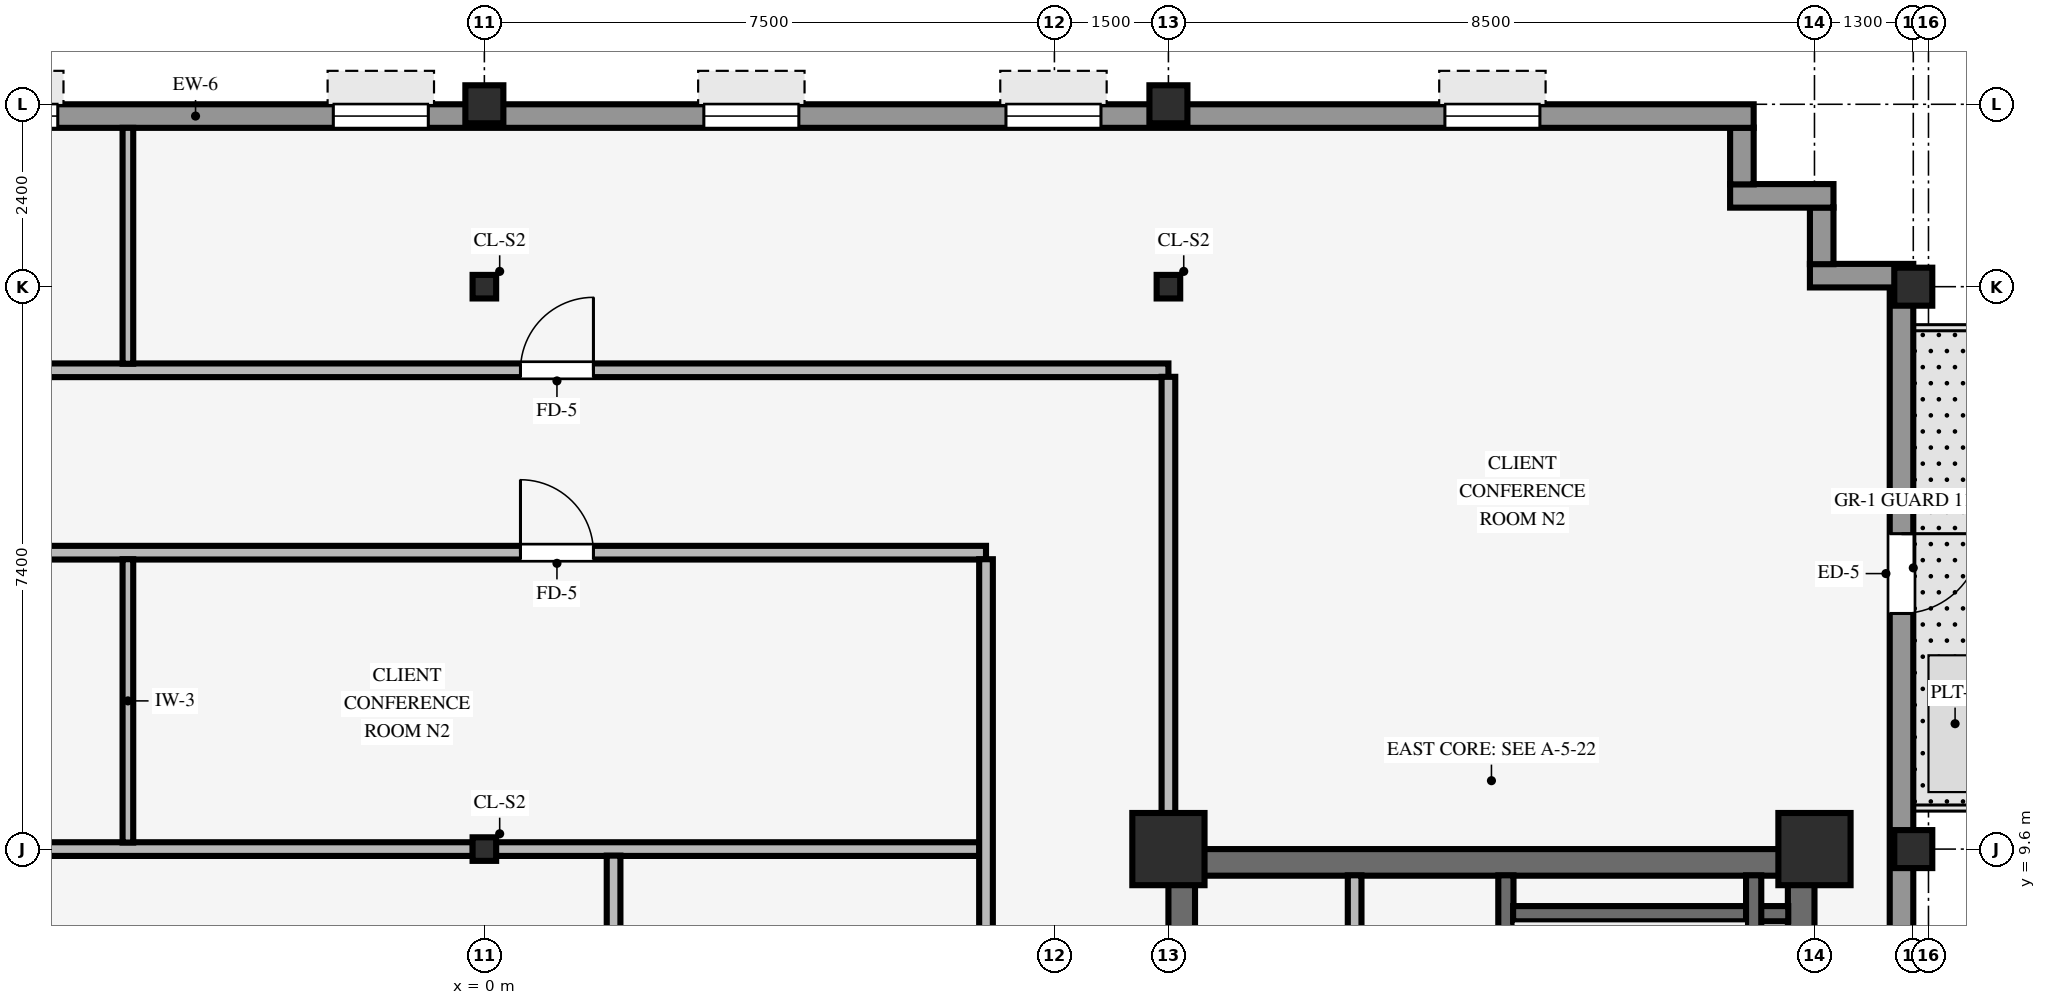
"""IFC4 building model, lengths in metres.
Left out: names, types, materials, properties, quantities, classifications, styles, units other than length and angle.
Written with IfcOpenShell. Run it as: python <this file> out.ifc"""

import sys

from ifc_helpers import new_model, si_unit, direction, frame, frame_2d, origin, origin_2d, place, context, subcontext, project, spatial, rectangle, hollow_rectangle, i_section, extrude, source, transform, mapped, element, fill, save


model = new_model("IFC4")
c1 = context("Model", 3, precision=1e-05, world=origin(), true_north=direction((0.0, 1.0)))
c2 = subcontext(c1, "Body", "Model", "MODEL_VIEW")
j1 = project(units=[si_unit("LENGTHUNIT", "METRE"), si_unit("PLANEANGLEUNIT", "RADIAN")], contexts=[c1])
p1 = place(None, origin())
s1 = spatial("IfcSite", under=j1, at=p1, CompositionType="ELEMENT")
p2 = place(p1, origin())
s2 = spatial("IfcBuilding", under=s1, at=p2, CompositionType="ELEMENT")
p3 = place(p2, frame((0.0, 0.0, 212.8)))
s3 = spatial("IfcBuildingStorey", under=s2, at=p3, CompositionType="ELEMENT", Elevation=212.8)
p4 = place(p3, frame((9.0, 9.425, 0.0), z_axis=(0.0, 0.0, 1.0), x_axis=(1.0, 0.0, 0.0)))
e1 = element("IfcWall", 1, at=p4, inside=s3, PredefinedType="SHEAR", context=c2, shape_type="SweptSolid", body=[
    extrude(rectangle(XDim=8.5, YDim=0.35, at=frame_2d((4.25, 0.0))), origin(), (0.0, 0.0, 1.0), 3.37),
])
p5 = place(p3, frame((9.175, -9.255, 0.0), z_axis=(0.0, 0.0, 1.0), x_axis=(0.0, 1.0, 0.0)))
e2 = element("IfcWall", 2, at=p5, inside=s3, PredefinedType="SHEAR", context=c2, shape_type="SweptSolid", body=[
    extrude(rectangle(XDim=18.51, YDim=0.35, at=frame_2d((9.255, 0.0))), origin(), (0.0, 0.0, 1.0), 3.37),
])
p6 = place(p5, frame((8.655, 0.0, 0.0)))
e3 = element("IfcOpeningElement", 3, at=p6, cuts=e2, PredefinedType="OPENING", context=c2, shape_type="SweptSolid", body=[
    extrude(rectangle(XDim=1.2, YDim=2.15, at=frame_2d((0.6, 1.075))), frame((0.0, 0.185, 0.0), z_axis=(0.0, -1.0, 0.0), x_axis=(1.0, 0.0, 0.0)), (0.0, 0.0, 1.0), 0.37),
])
p7 = place(p3, frame((17.325, -9.255, 0.0), z_axis=(0.0, 0.0, 1.0), x_axis=(0.0, 1.0, 0.0)))
e4 = element("IfcWall", 4, at=p7, inside=s3, PredefinedType="SHEAR", context=c2, shape_type="SweptSolid", body=[
    extrude(rectangle(XDim=18.51, YDim=0.35, at=frame_2d((9.255, 0.0))), origin(), (0.0, 0.0, 1.0), 3.37),
])
for number, where, z_axis, x_axis in (
    (5, (9.0, 9.6, 0.0), (0.0, 0.0, 1.0), (1.0, 0.0, 0.0)),
    (6, (17.5, 9.6, 0.0), (0.0, 0.0, 1.0), (1.0, 0.0, 0.0)),
):
    element("IfcColumn", number, at=place(p3, frame(where, z_axis=z_axis, x_axis=x_axis)), inside=s3, PredefinedType="COLUMN", context=c2, shape_type="SweptSolid", body=[
        extrude(rectangle(XDim=0.95, YDim=0.95, at=origin_2d()), origin(), (0.0, 0.0, 1.0), 3.37),
    ])
for number, where, z_axis, x_axis in (
    (7, (18.8, 9.6, 0.0), (0.0, 0.0, 1.0), (1.0, 0.0, 0.0)),
    (8, (18.8, 17.0, 0.0), (0.0, 0.0, 1.0), (1.0, 0.0, 0.0)),
    (9, (0.0, 19.4, 0.0), (0.0, 0.0, 1.0), (1.0, 0.0, 0.0)),
    (10, (9.0, 19.4, 0.0), (0.0, 0.0, 1.0), (1.0, 0.0, 0.0)),
):
    element("IfcColumn", number, at=place(p3, frame(where, z_axis=z_axis, x_axis=x_axis)), inside=s3, PredefinedType="COLUMN", context=c2, shape_type="SweptSolid", body=[
        extrude(hollow_rectangle(XDim=0.5, YDim=0.5, WallThickness=0.032, InnerFilletRadius=0.032, OuterFilletRadius=0.064, at=origin_2d()), origin(), (0.0, 0.0, 1.0), 3.37),
    ])
for number, where, z_axis, x_axis in (
    (11, (0.0, 9.6, 0.0), (0.0, 0.0, 1.0), (1.0, 0.0, 0.0)),
    (12, (0.0, 17.0, 0.0), (0.0, 0.0, 1.0), (1.0, 0.0, 0.0)),
    (13, (9.0, 17.0, 0.0), (0.0, 0.0, 1.0), (1.0, 0.0, 0.0)),
):
    element("IfcColumn", number, at=place(p3, frame(where, z_axis=z_axis, x_axis=x_axis)), inside=s3, PredefinedType="COLUMN", context=c2, shape_type="SweptSolid", body=[
        extrude(i_section(OverallWidth=0.31, OverallDepth=0.31, WebThickness=0.015, FlangeThickness=0.015, FilletRadius=0.015, at=origin_2d()), origin(), (0.0, 0.0, 1.0), 3.37),
    ])
p8 = place(p3, frame((18.645, -16.994, 0.0), z_axis=(0.0, 0.0, 1.0), x_axis=(0.0, 1.0, 0.0)))
e14 = element("IfcWall", 14, at=p8, inside=s3, PredefinedType="STANDARD", context=c2, shape_type="SweptSolid", body=[
    extrude(rectangle(XDim=33.988, YDim=0.31, at=frame_2d((16.994, 0.0))), origin(), (0.0, 0.0, 1.0), 2.705),
])
p9 = place(p8, frame((30.744, 0.0, 0.0), z_axis=(0.0, 0.0, 1.0), x_axis=(-1.0, 0.0, 0.0)))
e15 = element("IfcOpeningElement", 15, at=p9, cuts=e14, PredefinedType="OPENING", context=c2, shape_type="SweptSolid", body=[
    extrude(rectangle(XDim=1.05, YDim=2.1, at=frame_2d((0.525, 1.05))), frame((0.0, 0.165, 0.0), z_axis=(0.0, -1.0, 0.0), x_axis=(1.0, 0.0, 0.0)), (0.0, 0.0, 1.0), 0.33),
])
p10 = place(p8, frame((2.26, 0.0, 0.8)))
e16 = element("IfcOpeningElement", 16, at=p10, cuts=e14, PredefinedType="OPENING", context=c2, shape_type="SweptSolid", body=[
    extrude(rectangle(XDim=2.05, YDim=1.52, at=frame_2d((1.025, 0.76))), frame((0.0, 0.165, 0.0), z_axis=(0.0, -1.0, 0.0), x_axis=(1.0, 0.0, 0.0)), (0.0, 0.0, 1.0), 0.33),
])
p11 = place(p3, frame((17.44, 17.145, 0.0), z_axis=(0.0, 0.0, 1.0), x_axis=(1.0, 0.0, 0.0)))
e17 = element("IfcWall", 17, at=p11, inside=s3, PredefinedType="STANDARD", context=c2, shape_type="SweptSolid", body=[
    extrude(rectangle(XDim=1.36, YDim=0.31, at=frame_2d((0.68, 0.0))), origin(), (0.0, 0.0, 1.0), 2.816),
])
p12 = place(p3, frame((17.595, 17.296, 0.0), z_axis=(0.0, 0.0, 1.0), x_axis=(0.0, 1.0, 0.0)))
e18 = element("IfcWall", 18, at=p12, inside=s3, PredefinedType="STANDARD", context=c2, shape_type="SweptSolid", body=[
    extrude(rectangle(XDim=0.748, YDim=0.31, at=frame_2d((0.374, 0.0))), origin(), (0.0, 0.0, 1.0), 2.816),
])
p13 = place(p3, frame((16.39, 18.195, 0.0), z_axis=(0.0, 0.0, 1.0), x_axis=(1.0, 0.0, 0.0)))
e19 = element("IfcWall", 19, at=p13, inside=s3, PredefinedType="STANDARD", context=c2, shape_type="SweptSolid", body=[
    extrude(rectangle(XDim=1.36, YDim=0.31, at=frame_2d((0.68, 0.0))), origin(), (0.0, 0.0, 1.0), 2.816),
])
p14 = place(p3, frame((16.545, 18.346, 0.0), z_axis=(0.0, 0.0, 1.0), x_axis=(0.0, 1.0, 0.0)))
e20 = element("IfcWall", 20, at=p14, inside=s3, PredefinedType="STANDARD", context=c2, shape_type="SweptSolid", body=[
    extrude(rectangle(XDim=0.748, YDim=0.31, at=frame_2d((0.374, 0.0))), origin(), (0.0, 0.0, 1.0), 2.816),
])
p15 = place(p3, frame((-24.3, 19.245, 0.0), z_axis=(0.0, 0.0, 1.0), x_axis=(1.0, 0.0, 0.0)))
e21 = element("IfcWall", 21, at=p15, inside=s3, PredefinedType="STANDARD", context=c2, shape_type="SweptSolid", body=[
    extrude(rectangle(XDim=41.0, YDim=0.31, at=frame_2d((20.5, 0.0))), origin(), (0.0, 0.0, 1.0), 2.705),
])
p16 = place(p15, frame((2.812, 0.0, 0.8)))
e22 = element("IfcOpeningElement", 22, at=p16, cuts=e21, PredefinedType="OPENING", context=c2, shape_type="SweptSolid", body=[
    extrude(rectangle(XDim=1.25, YDim=1.52, at=frame_2d((0.625, 0.76))), frame((0.0, 0.165, 0.0), z_axis=(0.0, -1.0, 0.0), x_axis=(1.0, 0.0, 0.0)), (0.0, 0.0, 1.0), 0.33),
])
p17 = place(p15, frame((7.688, 0.0, 0.8)))
e23 = element("IfcOpeningElement", 23, at=p17, cuts=e21, PredefinedType="OPENING", context=c2, shape_type="SweptSolid", body=[
    extrude(rectangle(XDim=1.25, YDim=1.52, at=frame_2d((0.625, 0.76))), frame((0.0, 0.165, 0.0), z_axis=(0.0, -1.0, 0.0), x_axis=(1.0, 0.0, 0.0)), (0.0, 0.0, 1.0), 0.33),
])
p18 = place(p15, frame((12.562, 0.0, 0.8)))
e24 = element("IfcOpeningElement", 24, at=p18, cuts=e21, PredefinedType="OPENING", context=c2, shape_type="SweptSolid", body=[
    extrude(rectangle(XDim=1.25, YDim=1.52, at=frame_2d((0.625, 0.76))), frame((0.0, 0.165, 0.0), z_axis=(0.0, -1.0, 0.0), x_axis=(1.0, 0.0, 0.0)), (0.0, 0.0, 1.0), 0.33),
])
p19 = place(p15, frame((17.438, 0.0, 0.8)))
e25 = element("IfcOpeningElement", 25, at=p19, cuts=e21, PredefinedType="OPENING", context=c2, shape_type="SweptSolid", body=[
    extrude(rectangle(XDim=1.25, YDim=1.52, at=frame_2d((0.625, 0.76))), frame((0.0, 0.165, 0.0), z_axis=(0.0, -1.0, 0.0), x_axis=(1.0, 0.0, 0.0)), (0.0, 0.0, 1.0), 0.33),
])
p20 = place(p15, frame((22.312, 0.0, 0.8)))
e26 = element("IfcOpeningElement", 26, at=p20, cuts=e21, PredefinedType="OPENING", context=c2, shape_type="SweptSolid", body=[
    extrude(rectangle(XDim=1.25, YDim=1.52, at=frame_2d((0.625, 0.76))), frame((0.0, 0.165, 0.0), z_axis=(0.0, -1.0, 0.0), x_axis=(1.0, 0.0, 0.0)), (0.0, 0.0, 1.0), 0.33),
])
p21 = place(p15, frame((27.188, 0.0, 0.8)))
e27 = element("IfcOpeningElement", 27, at=p21, cuts=e21, PredefinedType="OPENING", context=c2, shape_type="SweptSolid", body=[
    extrude(rectangle(XDim=1.25, YDim=1.52, at=frame_2d((0.625, 0.76))), frame((0.0, 0.165, 0.0), z_axis=(0.0, -1.0, 0.0), x_axis=(1.0, 0.0, 0.0)), (0.0, 0.0, 1.0), 0.33),
])
p22 = place(p15, frame((31.163, 0.0, 0.8)))
e28 = element("IfcOpeningElement", 28, at=p22, cuts=e21, PredefinedType="OPENING", context=c2, shape_type="SweptSolid", body=[
    extrude(rectangle(XDim=1.25, YDim=1.52, at=frame_2d((0.625, 0.76))), frame((0.0, 0.165, 0.0), z_axis=(0.0, -1.0, 0.0), x_axis=(1.0, 0.0, 0.0)), (0.0, 0.0, 1.0), 0.33),
])
p23 = place(p15, frame((36.938, 0.0, 0.8)))
e29 = element("IfcOpeningElement", 29, at=p23, cuts=e21, PredefinedType="OPENING", context=c2, shape_type="SweptSolid", body=[
    extrude(rectangle(XDim=1.25, YDim=1.52, at=frame_2d((0.625, 0.76))), frame((0.0, 0.165, 0.0), z_axis=(0.0, -1.0, 0.0), x_axis=(1.0, 0.0, 0.0)), (0.0, 0.0, 1.0), 0.33),
])
p24 = place(p3, frame((13.44, 0.9, 0.0), z_axis=(0.0, 0.0, 1.0), x_axis=(0.0, 1.0, 0.0)))
e30 = element("IfcWall", 30, at=p24, inside=s3, PredefinedType="SHEAR", context=c2, shape_type="SweptSolid", body=[
    extrude(rectangle(XDim=8.355, YDim=0.2, at=frame_2d((4.177, 0.0))), origin(), (0.0, 0.0, 1.0), 3.37),
])
p25 = place(p24, frame((0.43, 0.0, 0.0)))
e31 = element("IfcOpeningElement", 31, at=p25, cuts=e30, PredefinedType="OPENING", context=c2, shape_type="SweptSolid", body=[
    extrude(rectangle(XDim=1.1, YDim=2.15, at=frame_2d((0.55, 1.075))), frame((0.0, 0.11, 0.0), z_axis=(0.0, -1.0, 0.0), x_axis=(1.0, 0.0, 0.0)), (0.0, 0.0, 1.0), 0.22),
])
p26 = place(p3, frame((13.535, 8.75, 0.0), z_axis=(0.0, 0.0, 1.0), x_axis=(1.0, 0.0, 0.0)))
e32 = element("IfcWall", 32, at=p26, inside=s3, PredefinedType="SHEAR", context=c2, shape_type="SweptSolid", body=[
    extrude(rectangle(XDim=3.62, YDim=0.2, at=frame_2d((1.81, 0.0))), origin(), (0.0, 0.0, 1.0), 3.37),
])
p27 = place(p3, frame((16.7, 1.095, 0.0), z_axis=(0.0, 0.0, 1.0), x_axis=(0.0, 1.0, 0.0)))
e33 = element("IfcWall", 33, at=p27, inside=s3, PredefinedType="SHEAR", context=c2, shape_type="SweptSolid", body=[
    extrude(rectangle(XDim=8.16, YDim=0.2, at=frame_2d((4.08, 0.0))), origin(), (0.0, 0.0, 1.0), 3.37),
])
p28 = place(p3, frame((11.45, 1.49, 0.0), z_axis=(0.0, 0.0, 1.0), x_axis=(0.0, 1.0, 0.0)))
e34 = element("IfcWall", 34, at=p28, inside=s3, PredefinedType="PARTITIONING", context=c2, shape_type="SweptSolid", body=[
    extrude(rectangle(XDim=7.765, YDim=0.18, at=frame_2d((3.882, 0.0))), origin(), (0.0, 0.0, 1.0), 3.36),
])
p29 = place(p3, frame((-8.529, 9.6, 0.0), z_axis=(0.0, 0.0, 1.0), x_axis=(1.0, 0.0, 0.0)))
e35 = element("IfcWall", 35, at=p29, inside=s3, PredefinedType="PARTITIONING", context=c2, shape_type="SweptSolid", body=[
    extrude(rectangle(XDim=8.378, YDim=0.18, at=frame_2d((4.189, 0.0))), origin(), (0.0, 0.0, 1.0), 2.405),
])
p30 = place(p3, frame((0.151, 9.6, 0.0), z_axis=(0.0, 0.0, 1.0), x_axis=(1.0, 0.0, 0.0)))
e36 = element("IfcWall", 36, at=p30, inside=s3, PredefinedType="PARTITIONING", context=c2, shape_type="SweptSolid", body=[
    extrude(rectangle(XDim=6.363, YDim=0.18, at=frame_2d((3.182, 0.0))), origin(), (0.0, 0.0, 1.0), 2.405),
])
p31 = place(p3, frame((-17.7, 13.5, 0.0), z_axis=(0.0, 0.0, 1.0), x_axis=(1.0, 0.0, 0.0)))
e37 = element("IfcWall", 37, at=p31, inside=s3, PredefinedType="PARTITIONING", context=c2, shape_type="SweptSolid", body=[
    extrude(rectangle(XDim=24.3, YDim=0.18, at=frame_2d((12.15, 0.0))), origin(), (0.0, 0.0, 1.0), 3.008),
])
p32 = place(p31, frame((6.025, 0.0, 0.0)))
e38 = element("IfcOpeningElement", 38, at=p32, cuts=e37, PredefinedType="OPENING", context=c2, shape_type="SweptSolid", body=[
    extrude(rectangle(XDim=0.96, YDim=2.1, at=frame_2d((0.48, 1.05))), frame((0.0, 0.1, 0.0), z_axis=(0.0, -1.0, 0.0), x_axis=(1.0, 0.0, 0.0)), (0.0, 0.0, 1.0), 0.2),
])
p33 = place(p31, frame((18.175, 0.0, 0.0)))
e39 = element("IfcOpeningElement", 39, at=p33, cuts=e37, PredefinedType="OPENING", context=c2, shape_type="SweptSolid", body=[
    extrude(rectangle(XDim=0.96, YDim=2.1, at=frame_2d((0.48, 1.05))), frame((0.0, 0.1, 0.0), z_axis=(0.0, -1.0, 0.0), x_axis=(1.0, 0.0, 0.0)), (0.0, 0.0, 1.0), 0.2),
])
p34 = place(p3, frame((-26.09, 15.9, 0.0), z_axis=(0.0, 0.0, 1.0), x_axis=(1.0, 0.0, 0.0)))
e40 = element("IfcWall", 40, at=p34, inside=s3, PredefinedType="PARTITIONING", context=c2, shape_type="SweptSolid", body=[
    extrude(rectangle(XDim=35.09, YDim=0.18, at=frame_2d((17.545, 0.0))), origin(), (0.0, 0.0, 1.0), 3.36),
])
p35 = place(p34, frame((14.415, 0.0, 0.0)))
e41 = element("IfcOpeningElement", 41, at=p35, cuts=e40, PredefinedType="OPENING", context=c2, shape_type="SweptSolid", body=[
    extrude(rectangle(XDim=0.96, YDim=2.1, at=frame_2d((0.48, 1.05))), frame((0.0, 0.1, 0.0), z_axis=(0.0, -1.0, 0.0), x_axis=(1.0, 0.0, 0.0)), (0.0, 0.0, 1.0), 0.2),
])
p36 = place(p34, frame((26.565, 0.0, 0.0)))
e42 = element("IfcOpeningElement", 42, at=p36, cuts=e40, PredefinedType="OPENING", context=c2, shape_type="SweptSolid", body=[
    extrude(rectangle(XDim=0.96, YDim=2.1, at=frame_2d((0.48, 1.05))), frame((0.0, 0.1, 0.0), z_axis=(0.0, -1.0, 0.0), x_axis=(1.0, 0.0, 0.0)), (0.0, 0.0, 1.0), 0.2),
])
p37 = place(p3, frame((-4.69, 9.686, 0.0), z_axis=(0.0, 0.0, 1.0), x_axis=(0.0, 1.0, 0.0)))
e43 = element("IfcWall", 43, at=p37, inside=s3, PredefinedType="PARTITIONING", context=c2, shape_type="SweptSolid", body=[
    extrude(rectangle(XDim=3.728, YDim=0.14, at=frame_2d((1.864, 0.0))), origin(), (0.0, 0.0, 1.0), 3.36),
])
p38 = place(p3, frame((-4.69, 15.986, 0.0), z_axis=(0.0, 0.0, 1.0), x_axis=(0.0, 1.0, 0.0)))
e44 = element("IfcWall", 44, at=p38, inside=s3, PredefinedType="PARTITIONING", context=c2, shape_type="SweptSolid", body=[
    extrude(rectangle(XDim=3.104, YDim=0.14, at=frame_2d((1.552, 0.0))), origin(), (0.0, 0.0, 1.0), 3.36),
])
p39 = place(p3, frame((1.7, 1.336, 0.0), z_axis=(0.0, 0.0, 1.0), x_axis=(0.0, 1.0, 0.0)))
e45 = element("IfcWall", 45, at=p39, inside=s3, PredefinedType="PARTITIONING", context=c2, shape_type="SweptSolid", body=[
    extrude(rectangle(XDim=8.178, YDim=0.18, at=frame_2d((4.089, 0.0))), origin(), (0.0, 0.0, 1.0), 3.36),
])
p40 = place(p3, frame((6.6, 1.336, 0.0), z_axis=(0.0, 0.0, 1.0), x_axis=(0.0, 1.0, 0.0)))
e46 = element("IfcWall", 46, at=p40, inside=s3, PredefinedType="PARTITIONING", context=c2, shape_type="SweptSolid", body=[
    extrude(rectangle(XDim=12.078, YDim=0.18, at=frame_2d((6.039, 0.0))), origin(), (0.0, 0.0, 1.0), 3.36),
])
p41 = place(p40, frame((3.652, 0.0, 0.0)))
e47 = element("IfcOpeningElement", 47, at=p41, cuts=e46, PredefinedType="OPENING", context=c2, shape_type="SweptSolid", body=[
    extrude(rectangle(XDim=0.96, YDim=2.1, at=frame_2d((0.48, 1.05))), frame((0.0, 0.1, 0.0), z_axis=(0.0, -1.0, 0.0), x_axis=(1.0, 0.0, 0.0)), (0.0, 0.0, 1.0), 0.2),
])
p42 = place(p3, frame((9.0, 10.071, 0.0), z_axis=(0.0, 0.0, 1.0), x_axis=(0.0, 1.0, 0.0)))
e48 = element("IfcWall", 48, at=p42, inside=s3, PredefinedType="PARTITIONING", context=c2, shape_type="SweptSolid", body=[
    extrude(rectangle(XDim=5.743, YDim=0.18, at=frame_2d((2.872, 0.0))), origin(), (0.0, 0.0, 1.0), 2.816),
])
m1 = source(origin(), c2, "Body", "SweptSolid", [
    extrude(rectangle(XDim=1.05, YDim=2.1, at=frame_2d((0.525, 1.05))), frame((0.0, 0.025, 0.0), z_axis=(0.0, -1.0, 0.0), x_axis=(1.0, 0.0, 0.0)), (0.0, 0.0, 1.0), 0.05),
])
p43 = place(p9, origin())
e49 = element("IfcDoor", 49, at=p43, inside=s3, OperationType="SINGLE_SWING_LEFT", PredefinedType="DOOR", context=c2, shape_type="MappedRepresentation", body=[
    mapped(m1, transform((0.0, 0.0, 0.0), scale=1.0)),
])
fill(e15, e49)
m2 = source(origin(), c2, "Body", "SweptSolid", [
    extrude(rectangle(XDim=1.25, YDim=1.52, at=frame_2d((0.625, 0.76))), frame((0.0, 0.03, 0.0), z_axis=(0.0, -1.0, 0.0), x_axis=(1.0, 0.0, 0.0)), (0.0, 0.0, 1.0), 0.06),
])
p44 = place(p19, origin())
e50 = element("IfcWindow", 50, at=p44, inside=s3, PartitioningType="SINGLE_PANEL", PredefinedType="WINDOW", context=c2, shape_type="MappedRepresentation", body=[
    mapped(m2, transform((0.0, 0.0, 0.0), scale=1.0)),
])
fill(e25, e50)
p45 = place(p20, origin())
e51 = element("IfcWindow", 51, at=p45, inside=s3, PartitioningType="SINGLE_PANEL", PredefinedType="WINDOW", context=c2, shape_type="MappedRepresentation", body=[
    mapped(m2, transform((0.0, 0.0, 0.0), scale=1.0)),
])
fill(e26, e51)
p46 = place(p21, origin())
e52 = element("IfcWindow", 52, at=p46, inside=s3, PartitioningType="SINGLE_PANEL", PredefinedType="WINDOW", context=c2, shape_type="MappedRepresentation", body=[
    mapped(m2, transform((0.0, 0.0, 0.0), scale=1.0)),
])
fill(e27, e52)
p47 = place(p22, origin())
e53 = element("IfcWindow", 53, at=p47, inside=s3, PartitioningType="SINGLE_PANEL", PredefinedType="WINDOW", context=c2, shape_type="MappedRepresentation", body=[
    mapped(m2, transform((0.0, 0.0, 0.0), scale=1.0)),
])
fill(e28, e53)
p48 = place(p23, origin())
e54 = element("IfcWindow", 54, at=p48, inside=s3, PartitioningType="SINGLE_PANEL", PredefinedType="WINDOW", context=c2, shape_type="MappedRepresentation", body=[
    mapped(m2, transform((0.0, 0.0, 0.0), scale=1.0)),
])
fill(e29, e54)
m3 = source(origin(), c2, "Body", "SweptSolid", [
    extrude(rectangle(XDim=0.96, YDim=2.1, at=frame_2d((0.48, 1.05))), frame((0.0, 0.025, 0.0), z_axis=(0.0, -1.0, 0.0), x_axis=(1.0, 0.0, 0.0)), (0.0, 0.0, 1.0), 0.05),
])
p49 = place(p36, origin())
e55 = element("IfcDoor", 55, at=p49, inside=s3, OperationType="SINGLE_SWING_RIGHT", PredefinedType="DOOR", context=c2, shape_type="MappedRepresentation", body=[
    mapped(m3, transform((0.0, 0.0, 0.0), scale=1.0)),
])
fill(e42, e55)
p50 = place(p33, origin())
e56 = element("IfcDoor", 56, at=p50, inside=s3, OperationType="SINGLE_SWING_LEFT", PredefinedType="DOOR", context=c2, shape_type="MappedRepresentation", body=[
    mapped(m3, transform((0.0, 0.0, 0.0), scale=1.0)),
])
fill(e39, e56)
save(model, sys.argv[1])
